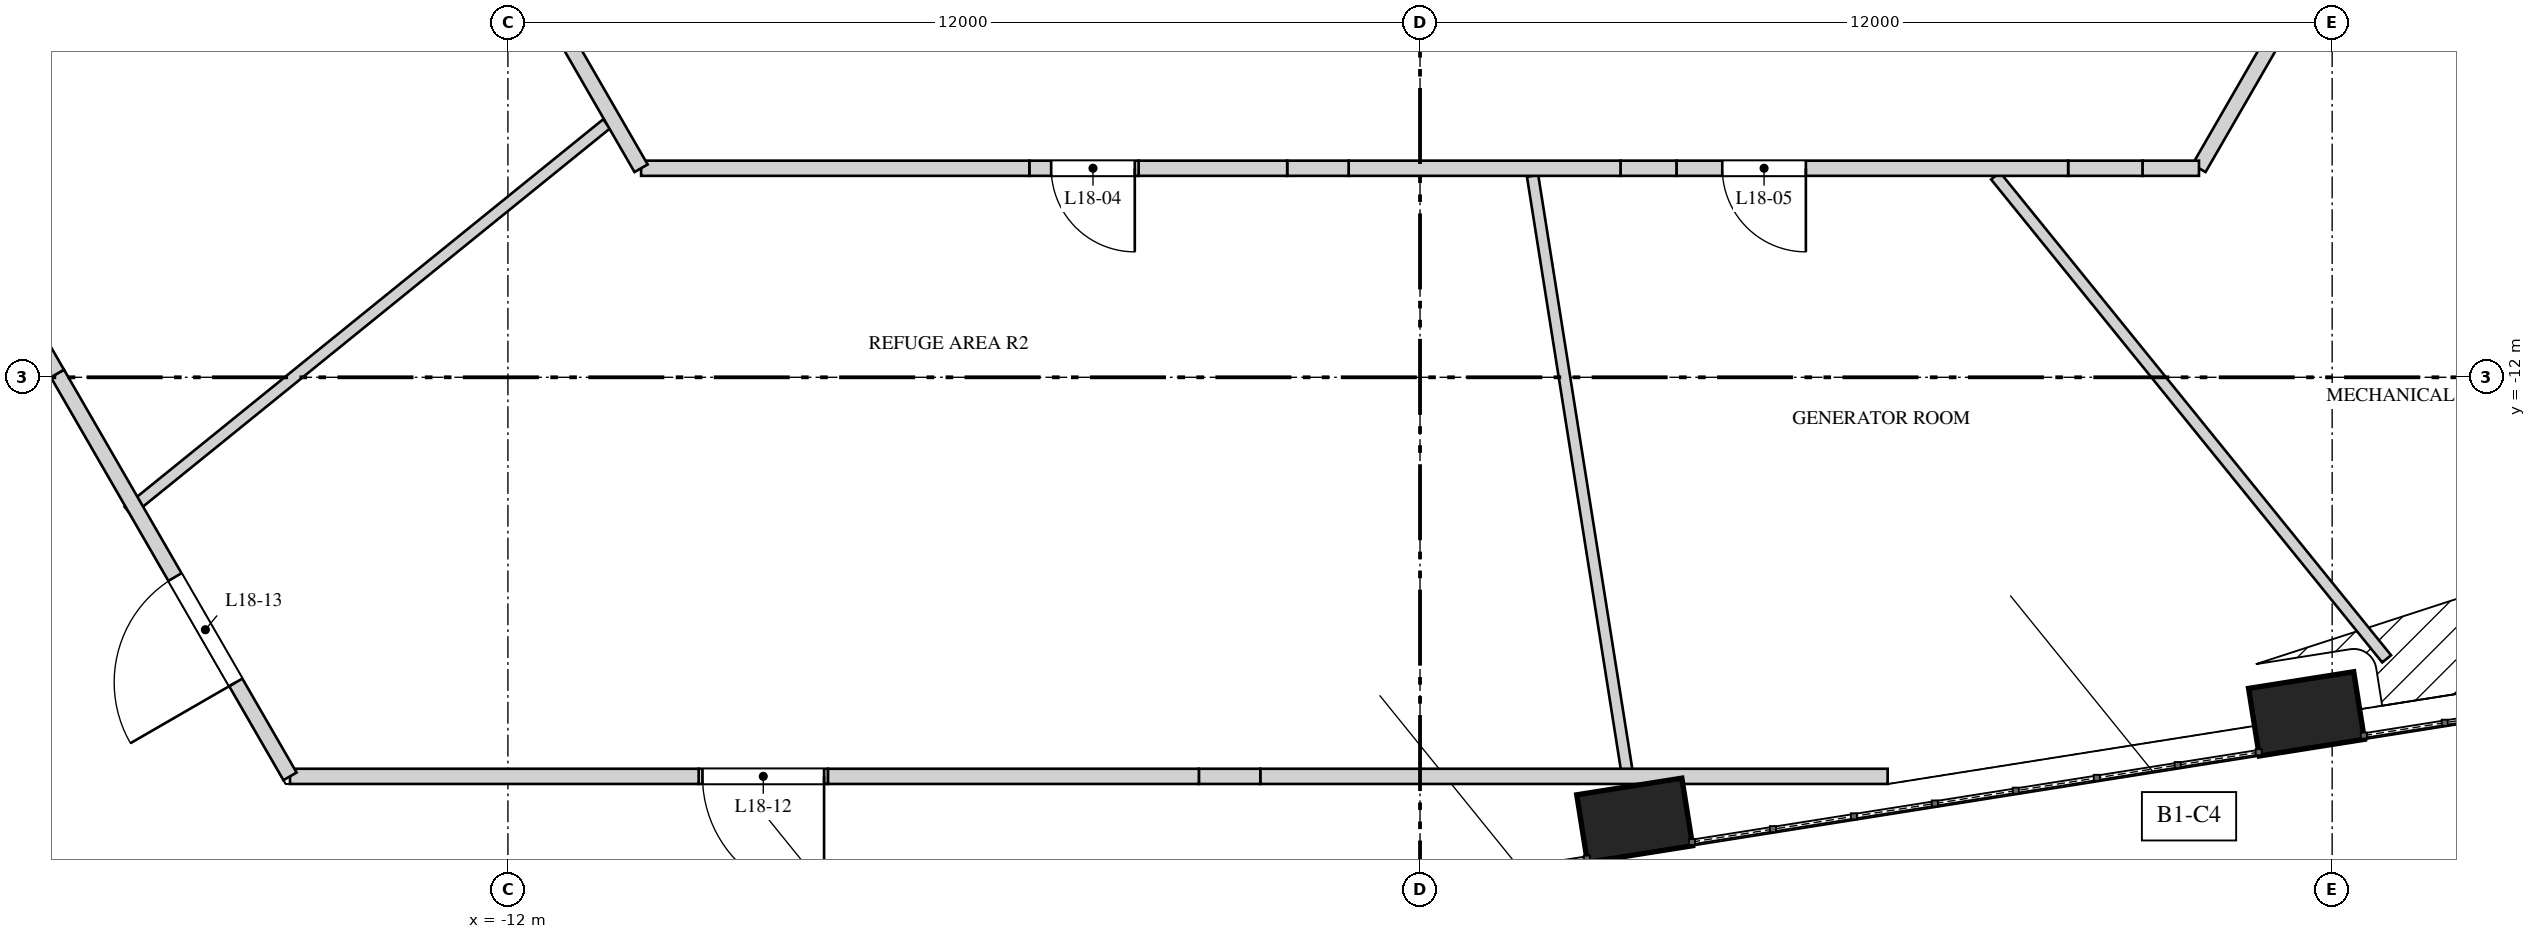
"""IFC4 building model, lengths in metres.
Left out: names, types, materials, properties, quantities, classifications, styles, units other than length and angle.
Written with IfcOpenShell. Run it as: python <this file> out.ifc"""

import sys

from ifc_helpers import new_model, si_unit, direction, frame, frame_2d, origin, origin_2d, place, context, subcontext, project, spatial, polyline, rectangle, outline, extrude, element, fill, save


model = new_model("IFC4")
c1 = context("Model", 3, precision=1e-05, world=origin(), true_north=direction((0.0, 1.0)))
c2 = subcontext(c1, "Body", "Model", "MODEL_VIEW")
j1 = project(units=[si_unit("LENGTHUNIT", "METRE"), si_unit("PLANEANGLEUNIT", "RADIAN")], contexts=[c1])
p1 = place(None, origin())
s1 = spatial("IfcSite", under=j1, at=p1, CompositionType="ELEMENT")
p2 = place(p1, origin())
s2 = spatial("IfcBuilding", under=s1, at=p2, CompositionType="ELEMENT")
p3 = place(p2, frame((0.0, 0.0, 83.2)))
s3 = spatial("IfcBuildingStorey", under=s2, at=p3, CompositionType="ELEMENT", Elevation=83.2)
for number, where, z_axis, x_axis in (
    (1, (2.824, -17.828, 0.0), (0.0, 0.0, 1.0), (0.988, 0.156, 0.0)),
    (2, (11.662, -16.428, 0.0), (0.0, 0.0, 1.0), (0.988, 0.156, 0.0)),
):
    element("IfcColumn", number, at=place(p3, frame(where, z_axis=z_axis, x_axis=x_axis)), inside=s3, PredefinedType="COLUMN", context=c2, shape_type="SweptSolid", body=[
        extrude(rectangle(XDim=1.4, YDim=0.9, at=origin_2d()), origin(), (0.0, 0.0, 1.0), 2.864),
    ])
p4 = place(p3, frame((-10.701, -8.666, 0.0), z_axis=(0.0, 0.0, 1.0), x_axis=(-0.777155716389, -0.629308344521, 0.0)))
e3 = element("IfcWall", 3, at=p4, inside=s3, PredefinedType="PARTITIONING", context=c2, shape_type="SweptSolid", body=[
    extrude(rectangle(XDim=8.1, YDim=0.15, at=frame_2d((4.05, 0.0))), origin(), (0.0, 0.0, 1.0), 4.85),
])
p5 = place(p3, frame((1.481, -9.35, 0.0), z_axis=(0.0, 0.0, 1.0), x_axis=(0.156424505608, -0.987689917963, 0.0)))
e4 = element("IfcWall", 4, at=p5, inside=s3, PredefinedType="PARTITIONING", context=c2, shape_type="SweptSolid", body=[
    extrude(rectangle(XDim=8.033, YDim=0.15, at=frame_2d((4.017, 0.0))), origin(), (0.0, 0.0, 1.0), 4.85),
])
p6 = place(p3, frame((7.572, -9.35, 0.0), z_axis=(0.0, 0.0, 1.0), x_axis=(0.629312469403, -0.777152376213, 0.0)))
e5 = element("IfcWall", 5, at=p6, inside=s3, PredefinedType="PARTITIONING", context=c2, shape_type="SweptSolid", body=[
    extrude(rectangle(XDim=8.176, YDim=0.15, at=frame_2d((4.088, 0.0))), origin(), (0.0, 0.0, 1.0), 4.85),
])
p7 = place(p3, frame((12.855, -4.935, 0.0), z_axis=(0.0, 0.0, 1.0), x_axis=(0.933584669528, -0.358356895878, 0.0)))
e6 = element("IfcWall", 6, at=p7, inside=s3, PredefinedType="PARTITIONING", context=c2, shape_type="SweptSolid", body=[
    extrude(rectangle(XDim=8.1, YDim=0.15, at=frame_2d((4.05, 0.0))), origin(), (0.0, 0.0, 1.0), 4.85),
])
p8 = place(p3, frame((11.249, -7.517, 0.0), z_axis=(0.0, 0.0, 1.0), x_axis=(-0.499944225447, -0.866057602843, 0.0)))
e7 = element("IfcWall", 7, at=p8, inside=s3, PredefinedType="SOLIDWALL", context=c2, shape_type="SweptSolid", body=[
    extrude(rectangle(XDim=2.001, YDim=0.2, at=frame_2d((1.0, 0.0))), origin(), (0.0, 0.0, 1.0), 4.85),
])
p9 = place(p3, frame((10.248, -9.25, 0.0), z_axis=(0.0, 0.0, 1.0), x_axis=(-1.0, 0.0, 0.0)))
e8 = element("IfcWall", 8, at=p9, inside=s3, PredefinedType="SOLIDWALL", context=c2, shape_type="SweptSolid", body=[
    extrude(rectangle(XDim=0.744, YDim=0.2, at=frame_2d((0.372, 0.0))), origin(), (0.0, 0.0, 1.0), 4.85),
])
p10 = place(p3, frame((9.504, -9.25, 0.0), z_axis=(0.0, 0.0, 1.0), x_axis=(-1.0, 0.0, 0.0)))
e9 = element("IfcWall", 9, at=p10, inside=s3, PredefinedType="SOLIDWALL", context=c2, shape_type="SweptSolid", body=[
    extrude(rectangle(XDim=0.978, YDim=0.2, at=frame_2d((0.489, 0.0))), origin(), (0.0, 0.0, 1.0), 4.15),
])
p11 = place(p3, frame((8.527, -9.25, 0.0), z_axis=(0.0, 0.0, 1.0), x_axis=(-1.0, 0.0, 0.0)))
e10 = element("IfcWall", 10, at=p11, inside=s3, PredefinedType="SOLIDWALL", context=c2, shape_type="SweptSolid", body=[
    extrude(rectangle(XDim=5.153, YDim=0.2, at=frame_2d((2.577, 0.0))), origin(), (0.0, 0.0, 1.0), 4.85),
])
p12 = place(p11, frame((3.451, 0.0, 0.0)))
e11 = element("IfcOpeningElement", 11, at=p12, cuts=e10, PredefinedType="OPENING", context=c2, shape_type="SweptSolid", body=[
    extrude(rectangle(XDim=1.1, YDim=2.2, at=frame_2d((0.55, 1.1))), frame((0.0, 0.11, 0.0), z_axis=(0.0, -1.0, 0.0), x_axis=(1.0, 0.0, 0.0)), (0.0, 0.0, 1.0), 0.22),
])
p13 = place(p3, frame((3.374, -9.25, 0.0), z_axis=(0.0, 0.0, 1.0), x_axis=(-1.0, 0.0, 0.0)))
e12 = element("IfcWall", 12, at=p13, inside=s3, PredefinedType="SOLIDWALL", context=c2, shape_type="SweptSolid", body=[
    extrude(rectangle(XDim=0.736, YDim=0.2, at=frame_2d((0.368, 0.0))), origin(), (0.0, 0.0, 1.0), 4.15),
])
p14 = place(p3, frame((2.637, -9.25, 0.0), z_axis=(0.0, 0.0, 1.0), x_axis=(-1.0, 0.0, 0.0)))
e13 = element("IfcWall", 13, at=p14, inside=s3, PredefinedType="SOLIDWALL", context=c2, shape_type="SweptSolid", body=[
    extrude(rectangle(XDim=3.577, YDim=0.2, at=frame_2d((1.789, 0.0))), origin(), (0.0, 0.0, 1.0), 4.85),
])
p15 = place(p3, frame((-0.939, -9.25, 0.0), z_axis=(0.0, 0.0, 1.0), x_axis=(-1.0, 0.0, 0.0)))
e14 = element("IfcWall", 14, at=p15, inside=s3, PredefinedType="SOLIDWALL", context=c2, shape_type="SweptSolid", body=[
    extrude(rectangle(XDim=0.808, YDim=0.2, at=frame_2d((0.404, 0.0))), origin(), (0.0, 0.0, 1.0), 3.95),
])
p16 = place(p3, frame((-1.748, -9.25, 0.0), z_axis=(0.0, 0.0, 1.0), x_axis=(-1.0, 0.0, 0.0)))
e15 = element("IfcWall", 15, at=p16, inside=s3, PredefinedType="SOLIDWALL", context=c2, shape_type="SweptSolid", body=[
    extrude(rectangle(XDim=1.955, YDim=0.2, at=frame_2d((0.978, 0.0))), origin(), (0.0, 0.0, 1.0), 4.85),
])
p17 = place(p3, frame((-3.703, -9.25, 0.0), z_axis=(0.0, 0.0, 1.0), x_axis=(-1.0, 0.0, 0.0)))
e16 = element("IfcWall", 16, at=p17, inside=s3, PredefinedType="SOLIDWALL", context=c2, shape_type="SweptSolid", body=[
    extrude(outline(polyline([(0.0, 0.0), (1.438, 0.0), (1.437, 3.75), (0.431, 3.75), (0.431, 4.85), (0.0, 4.85), (0.0, 0.0)])), frame((0.0, 0.1, 0.0), z_axis=(0.0, -1.0, 0.0), x_axis=(1.0, 0.0, 0.0)), (0.0, 0.0, 1.0), 0.2),
])
p18 = place(p17, frame((0.05, 0.0, 0.0)))
e17 = element("IfcOpeningElement", 17, at=p18, cuts=e16, PredefinedType="OPENING", context=c2, shape_type="SweptSolid", body=[
    extrude(rectangle(XDim=1.1, YDim=2.2, at=frame_2d((0.55, 1.1))), frame((0.0, 0.11, 0.0), z_axis=(0.0, -1.0, 0.0), x_axis=(1.0, 0.0, 0.0)), (0.0, 0.0, 1.0), 0.22),
])
p19 = place(p3, frame((-5.14, -9.25, 0.0), z_axis=(0.0, 0.0, 1.0), x_axis=(-1.0, 0.0, 0.0)))
e18 = element("IfcWall", 18, at=p19, inside=s3, PredefinedType="SOLIDWALL", context=c2, shape_type="SweptSolid", body=[
    extrude(rectangle(XDim=5.108, YDim=0.2, at=frame_2d((2.554, 0.0))), origin(), (0.0, 0.0, 1.0), 4.85),
])
p20 = place(p3, frame((-10.248, -9.25, 0.0), z_axis=(0.0, 0.0, 1.0), x_axis=(-0.499948741277, 0.866054996, 0.0)))
e19 = element("IfcWall", 19, at=p20, inside=s3, PredefinedType="SOLIDWALL", context=c2, shape_type="SweptSolid", body=[
    extrude(rectangle(XDim=1.868, YDim=0.2, at=frame_2d((0.934, 0.0))), origin(), (0.0, 0.0, 1.0), 4.85),
])
p21 = place(p3, frame((6.152, -17.25, 0.0), z_axis=(0.0, 0.0, 1.0), x_axis=(-1.0, 0.0, 0.0)))
e20 = element("IfcWall", 20, at=p21, inside=s3, PredefinedType="SOLIDWALL", context=c2, shape_type="SweptSolid", body=[
    extrude(rectangle(XDim=8.253, YDim=0.2, at=frame_2d((4.126, 0.0))), origin(), (0.0, 0.0, 1.0), 4.85),
])
p22 = place(p3, frame((-2.101, -17.25, 0.0), z_axis=(0.0, 0.0, 1.0), x_axis=(-1.0, 0.0, 0.0)))
e21 = element("IfcWall", 21, at=p22, inside=s3, PredefinedType="SOLIDWALL", context=c2, shape_type="SweptSolid", body=[
    extrude(rectangle(XDim=0.809, YDim=0.2, at=frame_2d((0.404, 0.0))), origin(), (0.0, 0.0, 1.0), 3.95),
])
p23 = place(p3, frame((-2.91, -17.25, 0.0), z_axis=(0.0, 0.0, 1.0), x_axis=(-1.0, 0.0, 0.0)))
e22 = element("IfcWall", 22, at=p23, inside=s3, PredefinedType="SOLIDWALL", context=c2, shape_type="SweptSolid", body=[
    extrude(rectangle(XDim=4.881, YDim=0.2, at=frame_2d((2.44, 0.0))), origin(), (0.0, 0.0, 1.0), 4.85),
])
p24 = place(p3, frame((-7.791, -17.25, 0.0), z_axis=(0.0, 0.0, 1.0), x_axis=(-1.0, 0.0, 0.0)))
e23 = element("IfcWall", 23, at=p24, inside=s3, PredefinedType="SOLIDWALL", context=c2, shape_type="SweptSolid", body=[
    extrude(outline(polyline([(0.0, 0.0), (1.7, 0.0), (1.7, 4.85), (1.36, 4.85), (1.36, 3.75), (0.353, 3.75), (0.353, 4.85), (0.0, 4.85), (0.0, 0.0)])), frame((0.0, 0.1, 0.0), z_axis=(0.0, -1.0, 0.0), x_axis=(1.0, 0.0, 0.0)), (0.0, 0.0, 1.0), 0.2),
])
p25 = place(p24, frame((0.05, 0.0, 0.0)))
e24 = element("IfcOpeningElement", 24, at=p25, cuts=e23, PredefinedType="OPENING", context=c2, shape_type="SweptSolid", body=[
    extrude(rectangle(XDim=1.6, YDim=2.3, at=frame_2d((0.8, 1.15))), frame((0.0, 0.11, 0.0), z_axis=(0.0, -1.0, 0.0), x_axis=(1.0, 0.0, 0.0)), (0.0, 0.0, 1.0), 0.22),
])
p26 = place(p3, frame((-9.49, -17.25, 0.0), z_axis=(0.0, 0.0, 1.0), x_axis=(-1.0, 0.0, 0.0)))
e25 = element("IfcWall", 25, at=p26, inside=s3, PredefinedType="SOLIDWALL", context=c2, shape_type="SweptSolid", body=[
    extrude(rectangle(XDim=5.376, YDim=0.2, at=frame_2d((2.688, 0.0))), origin(), (0.0, 0.0, 1.0), 4.85),
])
p27 = place(p3, frame((-14.867, -17.25, 0.0), z_axis=(0.0, 0.0, 1.0), x_axis=(-0.499991792115, 0.866030142557, 0.0)))
e26 = element("IfcWall", 26, at=p27, inside=s3, PredefinedType="SOLIDWALL", context=c2, shape_type="SweptSolid", body=[
    extrude(rectangle(XDim=6.12, YDim=0.2, at=frame_2d((3.06, 0.0))), origin(), (0.0, 0.0, 1.0), 4.85),
])
p28 = place(p27, frame((1.427, 0.0, 0.0)))
e27 = element("IfcOpeningElement", 27, at=p28, cuts=e26, PredefinedType="OPENING", context=c2, shape_type="SweptSolid", body=[
    extrude(rectangle(XDim=1.6, YDim=2.3, at=frame_2d((0.8, 1.15))), frame((0.0, 0.11, 0.0), z_axis=(0.0, -1.0, 0.0), x_axis=(1.0, 0.0, 0.0)), (0.0, 0.0, 1.0), 0.22),
])
p29 = place(p3, frame((-17.927, -11.95, 0.0), z_axis=(0.0, 0.0, 1.0), x_axis=(-0.500170954823, 0.865926680471, 0.0)))
e28 = element("IfcWall", 28, at=p29, inside=s3, PredefinedType="SOLIDWALL", context=c2, shape_type="SweptSolid", body=[
    extrude(rectangle(XDim=0.801, YDim=0.2, at=frame_2d((0.4, 0.0))), origin(), (0.0, 0.0, 1.0), 3.95),
])
p30 = place(p18, origin())
e29 = element("IfcDoor", 29, at=p30, inside=s3, OperationType="SINGLE_SWING_RIGHT", PredefinedType="DOOR", context=c2, shape_type="SweptSolid", body=[
    extrude(rectangle(XDim=1.1, YDim=2.2, at=frame_2d((0.55, 1.1))), frame((0.0, 0.025, 0.0), z_axis=(0.0, -1.0, 0.0), x_axis=(1.0, 0.0, 0.0)), (0.0, 0.0, 1.0), 0.05),
])
fill(e17, e29)
p31 = place(p12, origin())
e30 = element("IfcDoor", 30, at=p31, inside=s3, OperationType="SINGLE_SWING_LEFT", PredefinedType="DOOR", context=c2, shape_type="SweptSolid", body=[
    extrude(rectangle(XDim=1.1, YDim=2.2, at=frame_2d((0.55, 1.1))), frame((0.0, 0.025, 0.0), z_axis=(0.0, -1.0, 0.0), x_axis=(1.0, 0.0, 0.0)), (0.0, 0.0, 1.0), 0.05),
])
fill(e11, e30)
p32 = place(p25, origin())
e31 = element("IfcDoor", 31, at=p32, inside=s3, OperationType="DOUBLE_DOOR_SINGLE_SWING", PredefinedType="DOOR", context=c2, shape_type="SweptSolid", body=[
    extrude(rectangle(XDim=1.6, YDim=2.3, at=frame_2d((0.8, 1.15))), frame((0.0, 0.025, 0.0), z_axis=(0.0, -1.0, 0.0), x_axis=(1.0, 0.0, 0.0)), (0.0, 0.0, 1.0), 0.05),
])
fill(e24, e31)
p33 = place(p28, origin())
e32 = element("IfcDoor", 32, at=p33, inside=s3, OperationType="DOUBLE_DOOR_SINGLE_SWING", PredefinedType="DOOR", context=c2, shape_type="SweptSolid", body=[
    extrude(rectangle(XDim=1.6, YDim=2.3, at=frame_2d((0.8, 1.15))), frame((0.0, 0.025, 0.0), z_axis=(0.0, -1.0, 0.0), x_axis=(1.0, 0.0, 0.0)), (0.0, 0.0, 1.0), 0.05),
])
fill(e27, e32)
save(model, sys.argv[1])
